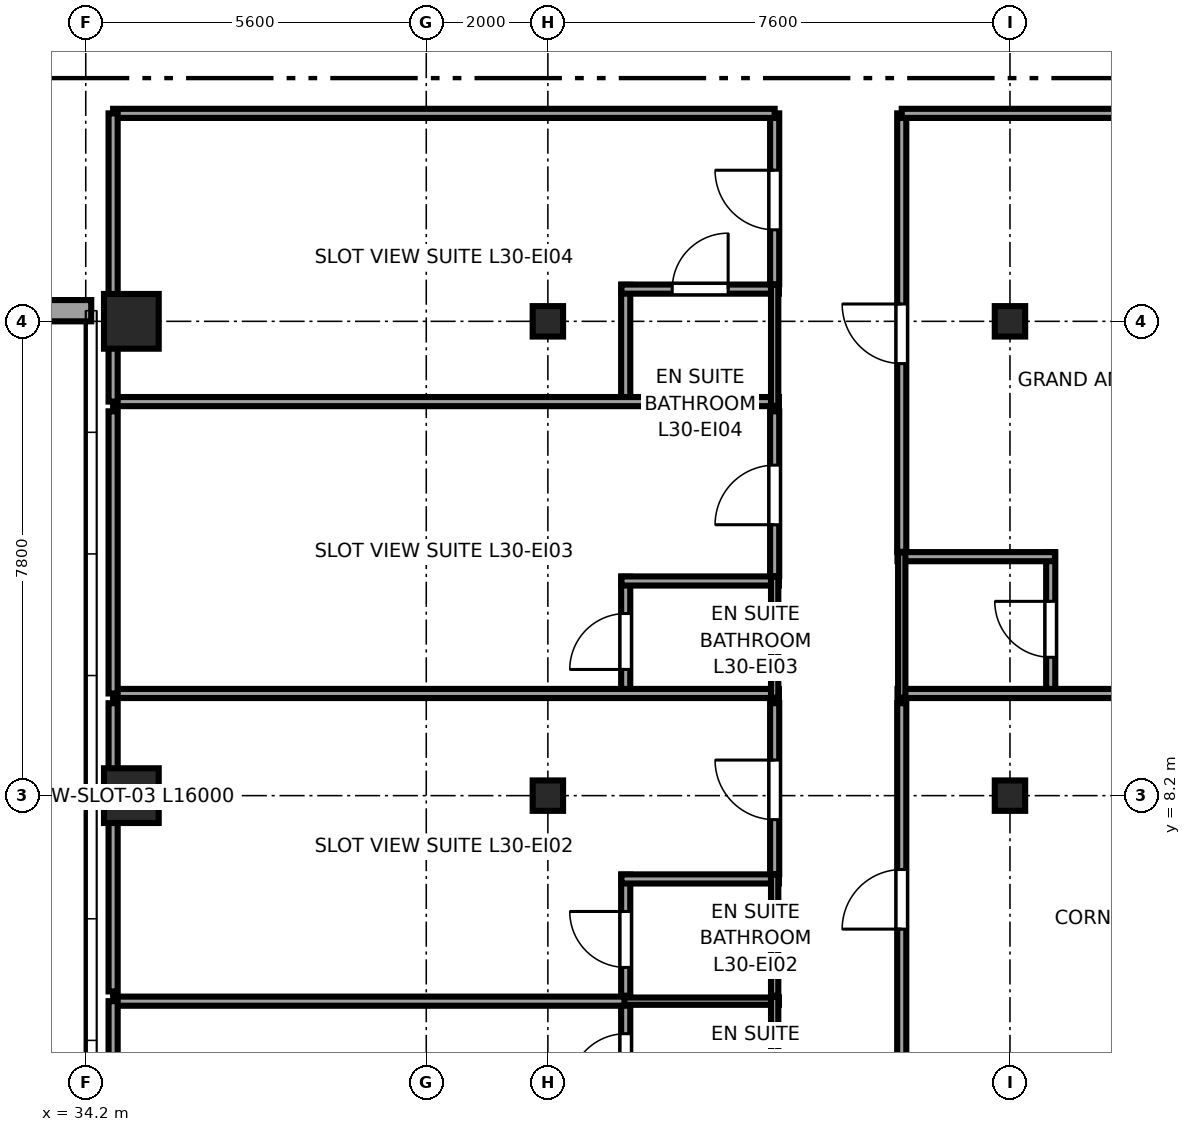
"""IFC4 building model, lengths in metres.
Left out: names, types, materials, properties, quantities, classifications, styles, units other than length and angle.
Written with IfcOpenShell. Run it as: python <this file> out.ifc"""

import sys

from ifc_helpers import new_model, si_unit, direction, frame, frame_2d, origin, origin_2d, place, context, subcontext, project, spatial, rectangle, i_section, extrude, source, transform, mapped, element, fill, save


model = new_model("IFC4")
c1 = context("Model", 3, precision=1e-05, world=origin(), true_north=direction((0.0, 1.0)))
c2 = subcontext(c1, "Body", "Model", "MODEL_VIEW")
j1 = project(units=[si_unit("LENGTHUNIT", "METRE"), si_unit("PLANEANGLEUNIT", "RADIAN")], contexts=[c1])
p1 = place(None, origin())
s1 = spatial("IfcSite", under=j1, at=p1, CompositionType="ELEMENT")
p2 = place(p1, origin())
s2 = spatial("IfcBuilding", under=s1, at=p2, CompositionType="ELEMENT")
p3 = place(p2, frame((0.0, 0.0, 118.65)))
s3 = spatial("IfcBuildingStorey", under=s2, at=p3, CompositionType="ELEMENT", Elevation=118.65)
m1 = source(origin(), c2, "Body", "SweptSolid", [
    extrude(rectangle(XDim=0.9, YDim=0.9, at=origin_2d()), origin(), (0.0, 0.0, 1.0), 3.55),
])
for number, where, z_axis, x_axis in (
    (1, (34.95, 8.2, 0.0), (0.0, 0.0, 1.0), (1.0, 0.0, 0.0)),
    (2, (34.95, 16.0, 0.0), (0.0, 0.0, 1.0), (1.0, 0.0, 0.0)),
):
    element("IfcColumn", number, at=place(p3, frame(where, z_axis=z_axis, x_axis=x_axis)), inside=s3, PredefinedType="COLUMN", context=c2, shape_type="MappedRepresentation", body=[
        mapped(m1, transform((0.0, 0.0, 0.0), x_axis=(1.0, 0.0, 0.0), y_axis=(0.0, 1.0, 0.0), z_axis=(0.0, 0.0, 1.0), scale=1.0)),
    ])
m2 = source(origin(), c2, "Body", "SweptSolid", [
    extrude(i_section(OverallWidth=0.5, OverallDepth=0.5, WebThickness=0.022, FlangeThickness=0.034, at=origin_2d()), origin(), (0.0, 0.0, 1.0), 3.55),
])
for number, where, z_axis, x_axis in (
    (3, (41.8, 8.2, 0.0), (0.0, 0.0, 1.0), (1.0, 0.0, 0.0)),
    (4, (41.8, 16.0, 0.0), (0.0, 0.0, 1.0), (1.0, 0.0, 0.0)),
    (5, (49.4, 8.2, 0.0), (0.0, 0.0, 1.0), (1.0, 0.0, 0.0)),
    (6, (49.4, 16.0, 0.0), (0.0, 0.0, 1.0), (1.0, 0.0, 0.0)),
):
    element("IfcColumn", number, at=place(p3, frame(where, z_axis=z_axis, x_axis=x_axis)), inside=s3, PredefinedType="COLUMN", context=c2, shape_type="MappedRepresentation", body=[
        mapped(m2, transform((0.0, 0.0, 0.0), x_axis=(1.0, 0.0, 0.0), y_axis=(0.0, 1.0, 0.0), z_axis=(0.0, 0.0, 1.0), scale=1.0)),
    ])
p4 = place(p3, frame((22.71, 16.175, 0.0), z_axis=(0.0, 0.0, 1.0), x_axis=(1.0, 0.0, 0.0)))
e7 = element("IfcWall", 7, at=p4, inside=s3, PredefinedType="SOLIDWALL", context=c2, shape_type="SweptSolid", body=[
    extrude(rectangle(XDim=11.58, YDim=0.35, at=frame_2d((5.79, 0.0))), origin(), (0.0, 0.0, 1.0), 2.748),
])
p5 = place(p4, frame((2.145, 0.0, 0.68)))
e8 = element("IfcOpeningElement", 8, at=p5, cuts=e7, PredefinedType="OPENING", context=c2, shape_type="SweptSolid", body=[
    extrude(rectangle(XDim=2.1, YDim=1.9, at=frame_2d((1.05, 0.95))), frame((0.0, 0.185, 0.0), z_axis=(0.0, -1.0, 0.0), x_axis=(1.0, 0.0, 0.0)), (0.0, 0.0, 1.0), 0.37),
])
p6 = place(p4, frame((7.335, 0.0, 0.68)))
e9 = element("IfcOpeningElement", 9, at=p6, cuts=e7, PredefinedType="OPENING", context=c2, shape_type="SweptSolid", body=[
    extrude(rectangle(XDim=2.1, YDim=1.9, at=frame_2d((1.05, 0.95))), frame((0.0, 0.185, 0.0), z_axis=(0.0, -1.0, 0.0), x_axis=(1.0, 0.0, 0.0)), (0.0, 0.0, 1.0), 0.37),
])
p7 = place(p3, frame((43.08, 2.9, 0.0), z_axis=(0.0, 0.0, 1.0), x_axis=(0.0, 1.0, 0.0)))
e10 = element("IfcWall", 10, at=p7, inside=s3, PredefinedType="PARTITIONING", context=c2, shape_type="SweptSolid", body=[
    extrude(rectangle(XDim=1.99, YDim=0.15, at=frame_2d((0.995, 0.0))), origin(), (0.0, 0.0, 1.0), 3.37),
])
p8 = place(p7, frame((0.465, 0.0, 0.0)))
e11 = element("IfcOpeningElement", 11, at=p8, cuts=e10, PredefinedType="OPENING", context=c2, shape_type="SweptSolid", body=[
    extrude(rectangle(XDim=0.92, YDim=2.01, at=frame_2d((0.46, 1.005))), frame((0.0, 0.085, 0.0), z_axis=(0.0, -1.0, 0.0), x_axis=(1.0, 0.0, 0.0)), (0.0, 0.0, 1.0), 0.17),
])
p9 = place(p3, frame((43.01, 4.82, 0.0), z_axis=(0.0, 0.0, 1.0), x_axis=(1.0, 0.0, 0.0)))
e12 = element("IfcWall", 12, at=p9, inside=s3, PredefinedType="PLUMBINGWALL", context=c2, shape_type="SweptSolid", body=[
    extrude(rectangle(XDim=2.59, YDim=0.12, at=frame_2d((1.295, 0.0))), origin(), (0.0, 0.0, 1.0), 3.37),
])
p10 = place(p3, frame((45.53, 2.9, 0.0), z_axis=(0.0, 0.0, 1.0), x_axis=(0.0, 1.0, 0.0)))
e13 = element("IfcWall", 13, at=p10, inside=s3, PredefinedType="PLUMBINGWALL", context=c2, shape_type="SweptSolid", body=[
    extrude(rectangle(XDim=1.99, YDim=0.12, at=frame_2d((0.995, 0.0))), origin(), (0.0, 0.0, 1.0), 3.37),
])
p11 = place(p3, frame((43.08, 4.91, 0.0), z_axis=(0.0, 0.0, 1.0), x_axis=(0.0, 1.0, 0.0)))
e14 = element("IfcWall", 14, at=p11, inside=s3, PredefinedType="PARTITIONING", context=c2, shape_type="SweptSolid", body=[
    extrude(rectangle(XDim=1.99, YDim=0.15, at=frame_2d((0.995, 0.0))), origin(), (0.0, 0.0, 1.0), 3.37),
])
p12 = place(p11, frame((0.465, 0.0, 0.0)))
e15 = element("IfcOpeningElement", 15, at=p12, cuts=e14, PredefinedType="OPENING", context=c2, shape_type="SweptSolid", body=[
    extrude(rectangle(XDim=0.92, YDim=2.01, at=frame_2d((0.46, 1.005))), frame((0.0, 0.085, 0.0), z_axis=(0.0, -1.0, 0.0), x_axis=(1.0, 0.0, 0.0)), (0.0, 0.0, 1.0), 0.17),
])
p13 = place(p3, frame((43.01, 6.83, 0.0), z_axis=(0.0, 0.0, 1.0), x_axis=(1.0, 0.0, 0.0)))
e16 = element("IfcWall", 16, at=p13, inside=s3, PredefinedType="PARTITIONING", context=c2, shape_type="SweptSolid", body=[
    extrude(rectangle(XDim=2.59, YDim=0.15, at=frame_2d((1.295, 0.0))), origin(), (0.0, 0.0, 1.0), 3.37),
])
p14 = place(p3, frame((45.53, 4.91, 0.0), z_axis=(0.0, 0.0, 1.0), x_axis=(0.0, 1.0, 0.0)))
e17 = element("IfcWall", 17, at=p14, inside=s3, PredefinedType="PLUMBINGWALL", context=c2, shape_type="SweptSolid", body=[
    extrude(rectangle(XDim=1.99, YDim=0.12, at=frame_2d((0.995, 0.0))), origin(), (0.0, 0.0, 1.0), 3.37),
])
p15 = place(p3, frame((43.08, 9.81, 0.0), z_axis=(0.0, 0.0, 1.0), x_axis=(0.0, 1.0, 0.0)))
e18 = element("IfcWall", 18, at=p15, inside=s3, PredefinedType="PARTITIONING", context=c2, shape_type="SweptSolid", body=[
    extrude(rectangle(XDim=1.99, YDim=0.15, at=frame_2d((0.995, 0.0))), origin(), (0.0, 0.0, 1.0), 3.37),
])
p16 = place(p15, frame((0.465, 0.0, 0.0)))
e19 = element("IfcOpeningElement", 19, at=p16, cuts=e18, PredefinedType="OPENING", context=c2, shape_type="SweptSolid", body=[
    extrude(rectangle(XDim=0.92, YDim=2.01, at=frame_2d((0.46, 1.005))), frame((0.0, 0.085, 0.0), z_axis=(0.0, -1.0, 0.0), x_axis=(1.0, 0.0, 0.0)), (0.0, 0.0, 1.0), 0.17),
])
p17 = place(p3, frame((34.65, 9.88, 0.0), z_axis=(0.0, 0.0, 1.0), x_axis=(1.0, 0.0, 0.0)))
e20 = element("IfcWall", 20, at=p17, inside=s3, PredefinedType="PARTITIONING", context=c2, shape_type="SweptSolid", body=[
    extrude(rectangle(XDim=10.95, YDim=0.15, at=frame_2d((5.475, 0.0))), origin(), (0.0, 0.0, 1.0), 3.37),
])
p18 = place(p3, frame((43.01, 11.73, 0.0), z_axis=(0.0, 0.0, 1.0), x_axis=(1.0, 0.0, 0.0)))
e21 = element("IfcWall", 21, at=p18, inside=s3, PredefinedType="PARTITIONING", context=c2, shape_type="SweptSolid", body=[
    extrude(rectangle(XDim=2.59, YDim=0.15, at=frame_2d((1.295, 0.0))), origin(), (0.0, 0.0, 1.0), 3.37),
])
p19 = place(p3, frame((45.53, 9.81, 0.0), z_axis=(0.0, 0.0, 1.0), x_axis=(0.0, 1.0, 0.0)))
e22 = element("IfcWall", 22, at=p19, inside=s3, PredefinedType="PLUMBINGWALL", context=c2, shape_type="SweptSolid", body=[
    extrude(rectangle(XDim=1.99, YDim=0.12, at=frame_2d((0.995, 0.0))), origin(), (0.0, 0.0, 1.0), 2.954),
])
p20 = place(p3, frame((43.08, 14.61, 0.0), z_axis=(0.0, 0.0, 1.0), x_axis=(0.0, 1.0, 0.0)))
e23 = element("IfcWall", 23, at=p20, inside=s3, PredefinedType="PARTITIONING", context=c2, shape_type="SweptSolid", body=[
    extrude(rectangle(XDim=1.99, YDim=0.15, at=frame_2d((0.995, 0.0))), origin(), (0.0, 0.0, 1.0), 3.37),
])
p21 = place(p3, frame((34.65, 14.68, 0.0), z_axis=(0.0, 0.0, 1.0), x_axis=(1.0, 0.0, 0.0)))
e24 = element("IfcWall", 24, at=p21, inside=s3, PredefinedType="PARTITIONING", context=c2, shape_type="SweptSolid", body=[
    extrude(rectangle(XDim=10.95, YDim=0.15, at=frame_2d((5.475, 0.0))), origin(), (0.0, 0.0, 1.0), 3.37),
])
p22 = place(p3, frame((43.01, 16.53, 0.0), z_axis=(0.0, 0.0, 1.0), x_axis=(1.0, 0.0, 0.0)))
e25 = element("IfcWall", 25, at=p22, inside=s3, PredefinedType="PARTITIONING", context=c2, shape_type="SweptSolid", body=[
    extrude(rectangle(XDim=2.59, YDim=0.15, at=frame_2d((1.295, 0.0))), origin(), (0.0, 0.0, 1.0), 3.37),
])
p23 = place(p22, frame((0.835, 0.0, 0.0)))
e26 = element("IfcOpeningElement", 26, at=p23, cuts=e25, PredefinedType="OPENING", context=c2, shape_type="SweptSolid", body=[
    extrude(rectangle(XDim=0.92, YDim=2.01, at=frame_2d((0.46, 1.005))), frame((0.0, 0.085, 0.0), z_axis=(0.0, -1.0, 0.0), x_axis=(1.0, 0.0, 0.0)), (0.0, 0.0, 1.0), 0.17),
])
p24 = place(p3, frame((45.53, 14.61, 0.0), z_axis=(0.0, 0.0, 1.0), x_axis=(0.0, 1.0, 0.0)))
e27 = element("IfcWall", 27, at=p24, inside=s3, PredefinedType="PLUMBINGWALL", context=c2, shape_type="SweptSolid", body=[
    extrude(rectangle(XDim=1.99, YDim=0.12, at=frame_2d((0.995, 0.0))), origin(), (0.0, 0.0, 1.0), 2.954),
])
p25 = place(p3, frame((50.07, 9.81, 0.0), z_axis=(0.0, 0.0, 1.0), x_axis=(0.0, 1.0, 0.0)))
e28 = element("IfcWall", 28, at=p25, inside=s3, PredefinedType="PARTITIONING", context=c2, shape_type="SweptSolid", body=[
    extrude(rectangle(XDim=2.39, YDim=0.15, at=frame_2d((1.195, 0.0))), origin(), (0.0, 0.0, 1.0), 3.37),
])
p26 = place(p25, frame((0.665, 0.0, 0.0)))
e29 = element("IfcOpeningElement", 29, at=p26, cuts=e28, PredefinedType="OPENING", context=c2, shape_type="SweptSolid", body=[
    extrude(rectangle(XDim=0.92, YDim=2.01, at=frame_2d((0.46, 1.005))), frame((0.0, 0.085, 0.0), z_axis=(0.0, -1.0, 0.0), x_axis=(1.0, 0.0, 0.0)), (0.0, 0.0, 1.0), 0.17),
])
p27 = place(p3, frame((47.55, 9.88, 0.0), z_axis=(0.0, 0.0, 1.0), x_axis=(1.0, 0.0, 0.0)))
e30 = element("IfcWall", 30, at=p27, inside=s3, PredefinedType="PARTITIONING", context=c2, shape_type="SweptSolid", body=[
    extrude(rectangle(XDim=9.045, YDim=0.15, at=frame_2d((4.522, 0.0))), origin(), (0.0, 0.0, 1.0), 3.37),
])
p28 = place(p3, frame((47.55, 12.13, 0.0), z_axis=(0.0, 0.0, 1.0), x_axis=(1.0, 0.0, 0.0)))
e31 = element("IfcWall", 31, at=p28, inside=s3, PredefinedType="PARTITIONING", context=c2, shape_type="SweptSolid", body=[
    extrude(rectangle(XDim=2.59, YDim=0.15, at=frame_2d((1.295, 0.0))), origin(), (0.0, 0.0, 1.0), 3.37),
])
p29 = place(p3, frame((47.62, 9.81, 0.0), z_axis=(0.0, 0.0, 1.0), x_axis=(0.0, 1.0, 0.0)))
e32 = element("IfcWall", 32, at=p29, inside=s3, PredefinedType="PLUMBINGWALL", context=c2, shape_type="SweptSolid", body=[
    extrude(rectangle(XDim=2.39, YDim=0.12, at=frame_2d((1.195, 0.0))), origin(), (0.0, 0.0, 1.0), 3.37),
])
p30 = place(p3, frame((34.65, 4.82, 0.0), z_axis=(0.0, 0.0, 1.0), x_axis=(1.0, 0.0, 0.0)))
e33 = element("IfcWall", 33, at=p30, inside=s3, PredefinedType="PARTITIONING", context=c2, shape_type="SweptSolid", body=[
    extrude(rectangle(XDim=8.41, YDim=0.15, at=frame_2d((4.205, 0.0))), origin(), (0.0, 0.0, 1.0), 3.37),
])
p31 = place(p3, frame((34.65, 0.405, 0.0), z_axis=(0.0, 0.0, 1.0), x_axis=(0.0, 1.0, 0.0)))
e34 = element("IfcWall", 34, at=p31, inside=s3, PredefinedType="PARTITIONING", context=c2, shape_type="SweptSolid", body=[
    extrude(rectangle(XDim=4.415, YDim=0.15, at=frame_2d((2.208, 0.0))), origin(), (0.0, 0.0, 1.0), 3.37),
])
p32 = place(p3, frame((45.53, 6.91, 0.0), z_axis=(0.0, 0.0, 1.0), x_axis=(0.0, 1.0, 0.0)))
e35 = element("IfcWall", 35, at=p32, inside=s3, PredefinedType="PARTITIONING", context=c2, shape_type="SweptSolid", body=[
    extrude(rectangle(XDim=2.81, YDim=0.15, at=frame_2d((1.405, 0.0))), origin(), (0.0, 0.0, 1.0), 2.954),
])
p33 = place(p32, frame((0.895, 0.0, 0.0)))
e36 = element("IfcOpeningElement", 36, at=p33, cuts=e35, PredefinedType="OPENING", context=c2, shape_type="SweptSolid", body=[
    extrude(rectangle(XDim=0.98, YDim=2.12, at=frame_2d((0.49, 1.06))), frame((0.0, 0.085, 0.0), z_axis=(0.0, -1.0, 0.0), x_axis=(1.0, 0.0, 0.0)), (0.0, 0.0, 1.0), 0.17),
])
p34 = place(p3, frame((34.65, 4.98, 0.0), z_axis=(0.0, 0.0, 1.0), x_axis=(0.0, 1.0, 0.0)))
e37 = element("IfcWall", 37, at=p34, inside=s3, PredefinedType="PARTITIONING", context=c2, shape_type="SweptSolid", body=[
    extrude(rectangle(XDim=4.74, YDim=0.15, at=frame_2d((2.37, 0.0))), origin(), (0.0, 0.0, 1.0), 3.37),
])
p35 = place(p3, frame((45.53, 11.81, 0.0), z_axis=(0.0, 0.0, 1.0), x_axis=(0.0, 1.0, 0.0)))
e38 = element("IfcWall", 38, at=p35, inside=s3, PredefinedType="PARTITIONING", context=c2, shape_type="SweptSolid", body=[
    extrude(rectangle(XDim=2.71, YDim=0.15, at=frame_2d((1.355, 0.0))), origin(), (0.0, 0.0, 1.0), 2.954),
])
p36 = place(p35, frame((0.845, 0.0, 0.0)))
e39 = element("IfcOpeningElement", 39, at=p36, cuts=e38, PredefinedType="OPENING", context=c2, shape_type="SweptSolid", body=[
    extrude(rectangle(XDim=0.98, YDim=2.12, at=frame_2d((0.49, 1.06))), frame((0.0, 0.085, 0.0), z_axis=(0.0, -1.0, 0.0), x_axis=(1.0, 0.0, 0.0)), (0.0, 0.0, 1.0), 0.17),
])
p37 = place(p3, frame((34.65, 9.88, 0.0), z_axis=(0.0, 0.0, 1.0), x_axis=(0.0, 1.0, 0.0)))
e40 = element("IfcWall", 40, at=p37, inside=s3, PredefinedType="PARTITIONING", context=c2, shape_type="SweptSolid", body=[
    extrude(rectangle(XDim=4.64, YDim=0.15, at=frame_2d((2.32, 0.0))), origin(), (0.0, 0.0, 1.0), 3.37),
])
p38 = place(p3, frame((45.53, 16.61, 0.0), z_axis=(0.0, 0.0, 1.0), x_axis=(0.0, 1.0, 0.0)))
e41 = element("IfcWall", 41, at=p38, inside=s3, PredefinedType="PARTITIONING", context=c2, shape_type="SweptSolid", body=[
    extrude(rectangle(XDim=2.81, YDim=0.15, at=frame_2d((1.405, 0.0))), origin(), (0.0, 0.0, 1.0), 2.954),
])
p39 = place(p38, frame((0.895, 0.0, 0.0)))
e42 = element("IfcOpeningElement", 42, at=p39, cuts=e41, PredefinedType="OPENING", context=c2, shape_type="SweptSolid", body=[
    extrude(rectangle(XDim=0.98, YDim=2.12, at=frame_2d((0.49, 1.06))), frame((0.0, 0.085, 0.0), z_axis=(0.0, -1.0, 0.0), x_axis=(1.0, 0.0, 0.0)), (0.0, 0.0, 1.0), 0.17),
])
p40 = place(p3, frame((34.65, 19.42, 0.0), z_axis=(0.0, 0.0, 1.0), x_axis=(1.0, 0.0, 0.0)))
e43 = element("IfcWall", 43, at=p40, inside=s3, PredefinedType="PARTITIONING", context=c2, shape_type="SweptSolid", body=[
    extrude(rectangle(XDim=10.88, YDim=0.15, at=frame_2d((5.44, 0.0))), origin(), (0.0, 0.0, 1.0), 3.37),
])
p41 = place(p3, frame((34.65, 14.68, 0.0), z_axis=(0.0, 0.0, 1.0), x_axis=(0.0, 1.0, 0.0)))
e44 = element("IfcWall", 44, at=p41, inside=s3, PredefinedType="PARTITIONING", context=c2, shape_type="SweptSolid", body=[
    extrude(rectangle(XDim=4.74, YDim=0.15, at=frame_2d((2.37, 0.0))), origin(), (0.0, 0.0, 1.0), 3.37),
])
p42 = place(p3, frame((47.62, 3.31, 0.0), z_axis=(0.0, 0.0, 1.0), x_axis=(0.0, 1.0, 0.0)))
e45 = element("IfcWall", 45, at=p42, inside=s3, PredefinedType="PARTITIONING", context=c2, shape_type="SweptSolid", body=[
    extrude(rectangle(XDim=6.41, YDim=0.15, at=frame_2d((3.205, 0.0))), origin(), (0.0, 0.0, 1.0), 3.37),
])
p43 = place(p42, frame((2.695, 0.0, 0.0)))
e46 = element("IfcOpeningElement", 46, at=p43, cuts=e45, PredefinedType="OPENING", context=c2, shape_type="SweptSolid", body=[
    extrude(rectangle(XDim=0.98, YDim=2.12, at=frame_2d((0.49, 1.06))), frame((0.0, 0.085, 0.0), z_axis=(0.0, -1.0, 0.0), x_axis=(1.0, 0.0, 0.0)), (0.0, 0.0, 1.0), 0.17),
])
p44 = place(p3, frame((47.62, 12.21, 0.0), z_axis=(0.0, 0.0, 1.0), x_axis=(0.0, 1.0, 0.0)))
e47 = element("IfcWall", 47, at=p44, inside=s3, PredefinedType="PARTITIONING", context=c2, shape_type="SweptSolid", body=[
    extrude(rectangle(XDim=7.21, YDim=0.15, at=frame_2d((3.605, 0.0))), origin(), (0.0, 0.0, 1.0), 3.37),
])
p45 = place(p44, frame((3.095, 0.0, 0.0)))
e48 = element("IfcOpeningElement", 48, at=p45, cuts=e47, PredefinedType="OPENING", context=c2, shape_type="SweptSolid", body=[
    extrude(rectangle(XDim=0.98, YDim=2.12, at=frame_2d((0.49, 1.06))), frame((0.0, 0.085, 0.0), z_axis=(0.0, -1.0, 0.0), x_axis=(1.0, 0.0, 0.0)), (0.0, 0.0, 1.0), 0.17),
])
p46 = place(p3, frame((47.62, 19.42, 0.0), z_axis=(0.0, 0.0, 1.0), x_axis=(1.0, 0.0, 0.0)))
e49 = element("IfcWall", 49, at=p46, inside=s3, PredefinedType="PARTITIONING", context=c2, shape_type="SweptSolid", body=[
    extrude(rectangle(XDim=8.975, YDim=0.15, at=frame_2d((4.487, 0.0))), origin(), (0.0, 0.0, 1.0), 3.37),
])
m3 = source(origin(), c2, "Body", "SweptSolid", [
    extrude(rectangle(XDim=0.92, YDim=2.01, at=frame_2d((0.46, 1.005))), frame((0.0, 0.025, 0.0), z_axis=(0.0, -1.0, 0.0), x_axis=(1.0, 0.0, 0.0)), (0.0, 0.0, 1.0), 0.05),
])
p47 = place(p8, origin())
e50 = element("IfcDoor", 50, at=p47, inside=s3, OperationType="SINGLE_SWING_LEFT", PredefinedType="DOOR", context=c2, shape_type="MappedRepresentation", body=[
    mapped(m3, transform((0.0, 0.0, 0.0), x_axis=(1.0, 0.0, 0.0), y_axis=(0.0, 1.0, 0.0), z_axis=(0.0, 0.0, 1.0), scale=1.0)),
])
fill(e11, e50)
p48 = place(p12, origin())
e51 = element("IfcDoor", 51, at=p48, inside=s3, OperationType="SINGLE_SWING_RIGHT", PredefinedType="DOOR", context=c2, shape_type="MappedRepresentation", body=[
    mapped(m3, transform((0.0, 0.0, 0.0), x_axis=(1.0, 0.0, 0.0), y_axis=(0.0, 1.0, 0.0), z_axis=(0.0, 0.0, 1.0), scale=1.0)),
])
fill(e15, e51)
p49 = place(p16, origin())
e52 = element("IfcDoor", 52, at=p49, inside=s3, OperationType="SINGLE_SWING_LEFT", PredefinedType="DOOR", context=c2, shape_type="MappedRepresentation", body=[
    mapped(m3, transform((0.0, 0.0, 0.0), x_axis=(1.0, 0.0, 0.0), y_axis=(0.0, 1.0, 0.0), z_axis=(0.0, 0.0, 1.0), scale=1.0)),
])
fill(e19, e52)
p50 = place(p23, origin())
e53 = element("IfcDoor", 53, at=p50, inside=s3, OperationType="SINGLE_SWING_RIGHT", PredefinedType="DOOR", context=c2, shape_type="MappedRepresentation", body=[
    mapped(m3, transform((0.0, 0.0, 0.0), x_axis=(1.0, 0.0, 0.0), y_axis=(0.0, 1.0, 0.0), z_axis=(0.0, 0.0, 1.0), scale=1.0)),
])
fill(e26, e53)
p51 = place(p26, origin())
e54 = element("IfcDoor", 54, at=p51, inside=s3, OperationType="SINGLE_SWING_RIGHT", PredefinedType="DOOR", context=c2, shape_type="MappedRepresentation", body=[
    mapped(m3, transform((0.0, 0.0, 0.0), x_axis=(1.0, 0.0, 0.0), y_axis=(0.0, 1.0, 0.0), z_axis=(0.0, 0.0, 1.0), scale=1.0)),
])
fill(e29, e54)
m4 = source(origin(), c2, "Body", "SweptSolid", [
    extrude(rectangle(XDim=0.98, YDim=2.12, at=frame_2d((0.49, 1.06))), frame((0.0, 0.025, 0.0), z_axis=(0.0, -1.0, 0.0), x_axis=(1.0, 0.0, 0.0)), (0.0, 0.0, 1.0), 0.05),
])
p52 = place(p33, origin())
e55 = element("IfcDoor", 55, at=p52, inside=s3, OperationType="SINGLE_SWING_RIGHT", PredefinedType="DOOR", context=c2, shape_type="MappedRepresentation", body=[
    mapped(m4, transform((0.0, 0.0, 0.0), x_axis=(1.0, 0.0, 0.0), y_axis=(0.0, 1.0, 0.0), z_axis=(0.0, 0.0, 1.0), scale=1.0)),
])
fill(e36, e55)
p53 = place(p36, origin())
e56 = element("IfcDoor", 56, at=p53, inside=s3, OperationType="SINGLE_SWING_LEFT", PredefinedType="DOOR", context=c2, shape_type="MappedRepresentation", body=[
    mapped(m4, transform((0.0, 0.0, 0.0), x_axis=(1.0, 0.0, 0.0), y_axis=(0.0, 1.0, 0.0), z_axis=(0.0, 0.0, 1.0), scale=1.0)),
])
fill(e39, e56)
p54 = place(p39, origin())
e57 = element("IfcDoor", 57, at=p54, inside=s3, OperationType="SINGLE_SWING_RIGHT", PredefinedType="DOOR", context=c2, shape_type="MappedRepresentation", body=[
    mapped(m4, transform((0.0, 0.0, 0.0), x_axis=(1.0, 0.0, 0.0), y_axis=(0.0, 1.0, 0.0), z_axis=(0.0, 0.0, 1.0), scale=1.0)),
])
fill(e42, e57)
p55 = place(p43, origin())
e58 = element("IfcDoor", 58, at=p55, inside=s3, OperationType="SINGLE_SWING_LEFT", PredefinedType="DOOR", context=c2, shape_type="MappedRepresentation", body=[
    mapped(m4, transform((0.0, 0.0, 0.0), x_axis=(1.0, 0.0, 0.0), y_axis=(0.0, 1.0, 0.0), z_axis=(0.0, 0.0, 1.0), scale=1.0)),
])
fill(e46, e58)
p56 = place(p45, origin())
e59 = element("IfcDoor", 59, at=p56, inside=s3, OperationType="SINGLE_SWING_RIGHT", PredefinedType="DOOR", context=c2, shape_type="MappedRepresentation", body=[
    mapped(m4, transform((0.0, 0.0, 0.0), x_axis=(1.0, 0.0, 0.0), y_axis=(0.0, 1.0, 0.0), z_axis=(0.0, 0.0, 1.0), scale=1.0)),
])
fill(e48, e59)
save(model, sys.argv[1])
